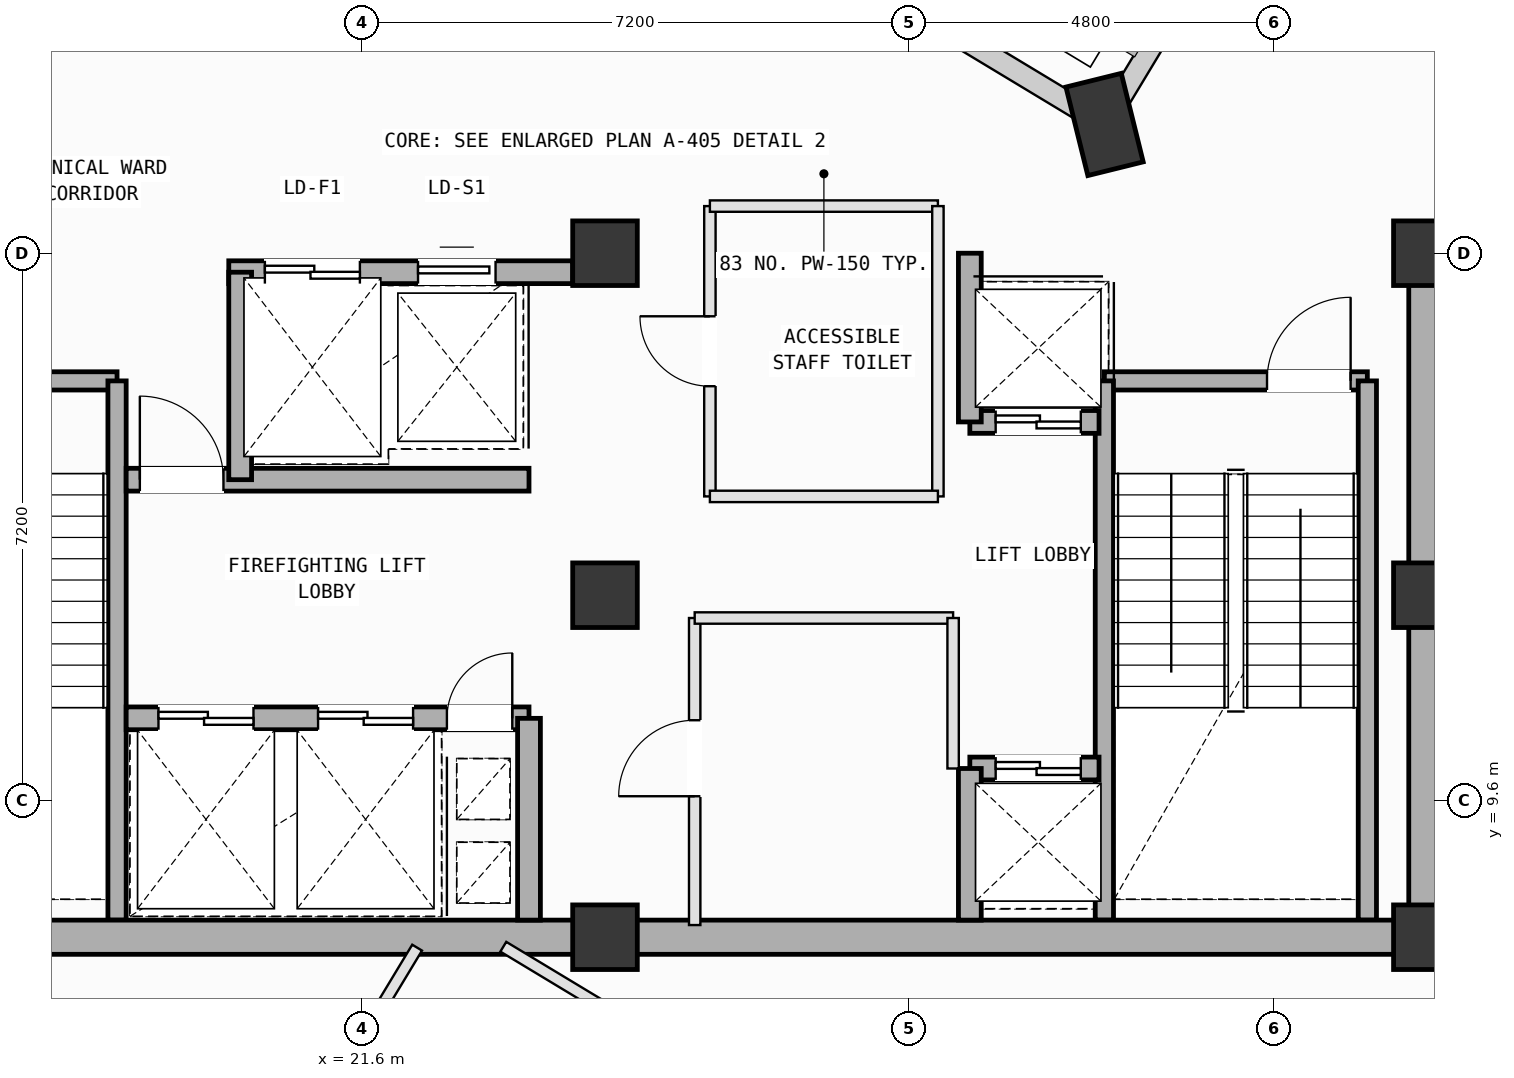
"""IFC4 building model, lengths in metres.
Left out: names, types, materials, properties, quantities, classifications, styles, units other than length and angle.
Written with IfcOpenShell. Run it as: python <this file> out.ifc"""

import sys

from ifc_helpers import new_model, si_unit, direction, frame, frame_2d, origin, origin_2d, place, context, subcontext, project, spatial, rectangle, extrude, element, fill, save


model = new_model("IFC4")
c1 = context("Model", 3, precision=1e-05, world=origin(), true_north=direction((0.0, 1.0)))
c2 = subcontext(c1, "Body", "Model", "MODEL_VIEW")
j1 = project(units=[si_unit("LENGTHUNIT", "METRE"), si_unit("PLANEANGLEUNIT", "RADIAN")], contexts=[c1])
p1 = place(None, origin())
s1 = spatial("IfcSite", under=j1, at=p1, CompositionType="ELEMENT")
p2 = place(p1, origin())
s2 = spatial("IfcBuilding", under=s1, at=p2, CompositionType="ELEMENT")
p3 = place(p2, frame((0.0, 0.0, 276.6)))
s3 = spatial("IfcBuildingStorey", under=s2, at=p3, CompositionType="ELEMENT", Elevation=276.6)
for number, where, z_axis, x_axis in (
    (1, (24.8, 7.8, 0.0), (0.0, 0.0, 1.0), (1.0, 0.0, 0.0)),
    (2, (24.8, 12.3, 0.0), (0.0, 0.0, 1.0), (1.0, 0.0, 0.0)),
    (3, (24.8, 16.8, 0.0), (0.0, 0.0, 1.0), (1.0, 0.0, 0.0)),
    (4, (35.6, 7.8, 0.0), (0.0, 0.0, 1.0), (1.0, 0.0, 0.0)),
    (5, (35.6, 12.3, 0.0), (0.0, 0.0, 1.0), (1.0, 0.0, 0.0)),
    (6, (35.6, 16.8, 0.0), (0.0, 0.0, 1.0), (1.0, 0.0, 0.0)),
):
    element("IfcColumn", number, at=place(p3, frame(where, z_axis=z_axis, x_axis=x_axis)), inside=s3, PredefinedType="COLUMN", context=c2, shape_type="SweptSolid", body=[
        extrude(rectangle(XDim=0.85, YDim=0.85, at=origin_2d()), origin(), (0.0, 0.0, 1.0), 4.0),
    ])
p4 = place(p3, frame((31.373, 18.494, 0.002), z_axis=(0.026198010128, -0.009038008156, 0.999615915577), x_axis=(-0.995635940105, 0.089360928723, 0.026901657753)))
e7 = element("IfcColumn", 7, at=p4, inside=s3, PredefinedType="COLUMN", context=c2, shape_type="SweptSolid", body=[
    extrude(rectangle(XDim=1.2, YDim=0.75, at=origin_2d()), origin(), (0.0, 0.0, 1.0), 3.998),
])
p5 = place(p3, frame((18.206, 4.353, 0.0), z_axis=(0.0, 0.0, 1.0), x_axis=(-0.856267913318, 0.516531955084, 0.0)))
e8 = element("IfcWall", 8, at=p5, inside=s3, PredefinedType="SOLIDWALL", context=c2, shape_type="SweptSolid", body=[
    extrude(rectangle(XDim=6.96, YDim=0.24, at=frame_2d((3.48, 0.0))), origin(), (0.0, 0.0, 1.0), 3.265),
])
p6 = place(p5, frame((2.93, 0.0, 0.0)))
e9 = element("IfcOpeningElement", 9, at=p6, cuts=e8, PredefinedType="OPENING", context=c2, shape_type="SweptSolid", body=[
    extrude(rectangle(XDim=1.1, YDim=2.15, at=frame_2d((0.55, 1.075))), frame((0.0, 0.13, 0.0), z_axis=(0.0, -1.0, 0.0), x_axis=(1.0, 0.0, 0.0)), (0.0, 0.0, 1.0), 0.26),
])
p7 = place(p3, frame((31.582, 18.841, 0.0), z_axis=(0.0, 0.0, 1.0), x_axis=(0.516523161172, 0.856273218064, 0.0)))
e10 = element("IfcWall", 10, at=p7, inside=s3, PredefinedType="SOLIDWALL", context=c2, shape_type="SweptSolid", body=[
    extrude(rectangle(XDim=6.158, YDim=0.28, at=frame_2d((3.079, 0.0))), origin(), (0.0, 0.0, 1.0), 3.265),
])
p8 = place(p7, frame((3.84, 0.0, 0.75)))
e11 = element("IfcOpeningElement", 11, at=p8, cuts=e10, PredefinedType="OPENING", context=c2, shape_type="SweptSolid", body=[
    extrude(rectangle(XDim=1.4, YDim=1.85, at=frame_2d((0.7, 0.925))), frame((0.0, 0.15, 0.0), z_axis=(0.0, -1.0, 0.0), x_axis=(1.0, 0.0, 0.0)), (0.0, 0.0, 1.0), 0.3),
])
p9 = place(p3, frame((25.121, 22.265, 0.0), z_axis=(0.0, 0.0, 1.0), x_axis=(0.856273819438, -0.516522164233, 0.0)))
e12 = element("IfcWall", 12, at=p9, inside=s3, PredefinedType="SOLIDWALL", context=c2, shape_type="SweptSolid", body=[
    extrude(rectangle(XDim=6.958, YDim=0.28, at=frame_2d((3.479, 0.0))), origin(), (0.0, 0.0, 1.0), 3.165),
])
p10 = place(p3, frame((14.92, 15.12, 0.0), z_axis=(0.0, 0.0, 1.0), x_axis=(1.0, 0.0, 0.0)))
e13 = element("IfcWall", 13, at=p10, inside=s3, PredefinedType="SOLIDWALL", context=c2, shape_type="SweptSolid", body=[
    extrude(rectangle(XDim=3.46, YDim=0.24, at=frame_2d((1.73, 0.0))), origin(), (0.0, 0.0, 1.0), 3.78),
])
p11 = place(p10, frame((0.22, 0.0, 0.0)))
e14 = element("IfcOpeningElement", 14, at=p11, cuts=e13, PredefinedType="OPENING", context=c2, shape_type="SweptSolid", body=[
    extrude(rectangle(XDim=1.1, YDim=2.15, at=frame_2d((0.55, 1.075))), frame((0.0, 0.13, 0.0), z_axis=(0.0, -1.0, 0.0), x_axis=(1.0, 0.0, 0.0)), (0.0, 0.0, 1.0), 0.26),
])
p12 = place(p3, frame((18.38, 15.12, 0.0), z_axis=(0.0, 0.0, 1.0), x_axis=(0.0, -1.0, 0.0)))
e15 = element("IfcWall", 15, at=p12, inside=s3, PredefinedType="SOLIDWALL", context=c2, shape_type="SweptSolid", body=[
    extrude(rectangle(XDim=7.095, YDim=0.24, at=frame_2d((3.548, 0.0))), origin(), (0.0, 0.0, 1.0), 3.78),
])
p13 = place(p3, frame((31.37, 15.12, 0.0), z_axis=(0.0, 0.0, 1.0), x_axis=(1.0, 0.0, 0.0)))
e16 = element("IfcWall", 16, at=p13, inside=s3, PredefinedType="SOLIDWALL", context=c2, shape_type="SweptSolid", body=[
    extrude(rectangle(XDim=3.46, YDim=0.24, at=frame_2d((1.73, 0.0))), origin(), (0.0, 0.0, 1.0), 3.78),
])
p14 = place(p13, frame((2.14, 0.0, 0.0)))
e17 = element("IfcOpeningElement", 17, at=p14, cuts=e16, PredefinedType="OPENING", context=c2, shape_type="SweptSolid", body=[
    extrude(rectangle(XDim=1.1, YDim=2.15, at=frame_2d((0.55, 1.075))), frame((0.0, 0.13, 0.0), z_axis=(0.0, -1.0, 0.0), x_axis=(1.0, 0.0, 0.0)), (0.0, 0.0, 1.0), 0.26),
])
for number, where, z_axis, x_axis in (
    (18, (34.83, 15.12, 0.0), (0.0, 0.0, 1.0), (0.0, -1.0, 0.0)),
    (19, (31.37, 8.025, 0.0), (0.0, 0.0, 1.0), (0.0, 1.0, 0.0)),
):
    element("IfcWall", number, at=place(p3, frame(where, z_axis=z_axis, x_axis=x_axis)), inside=s3, PredefinedType="SOLIDWALL", context=c2, shape_type="SweptSolid", body=[
        extrude(rectangle(XDim=7.095, YDim=0.24, at=frame_2d((3.548, 0.0))), origin(), (0.0, 0.0, 1.0), 3.78),
    ])
for number, where, z_axis, x_axis in (
    (20, (14.0, 7.8, 0.0), (0.0, 0.0, 1.0), (1.0, 0.0, 0.0)),
    (21, (24.8, 7.8, 0.0), (0.0, 0.0, 1.0), (1.0, 0.0, 0.0)),
):
    element("IfcWall", number, at=place(p3, frame(where, z_axis=z_axis, x_axis=x_axis)), inside=s3, PredefinedType="SHEAR", context=c2, shape_type="SweptSolid", body=[
        extrude(rectangle(XDim=10.8, YDim=0.45, at=frame_2d((5.4, 0.0))), origin(), (0.0, 0.0, 1.0), 3.78),
    ])
p15 = place(p3, frame((35.6, 7.8, 0.0), z_axis=(0.0, 0.0, 1.0), x_axis=(0.0, 1.0, 0.0)))
e22 = element("IfcWall", 22, at=p15, inside=s3, PredefinedType="SHEAR", context=c2, shape_type="SweptSolid", body=[
    extrude(rectangle(XDim=9.0, YDim=0.45, at=frame_2d((4.5, 0.0))), origin(), (0.0, 0.0, 1.0), 3.78),
])
p16 = place(p3, frame((19.85, 16.55, 0.0), z_axis=(0.0, 0.0, 1.0), x_axis=(1.0, 0.0, 0.0)))
e23 = element("IfcWall", 23, at=p16, inside=s3, PredefinedType="SOLIDWALL", context=c2, shape_type="SweptSolid", body=[
    extrude(rectangle(XDim=4.525, YDim=0.3, at=frame_2d((2.262, 0.0))), origin(), (0.0, 0.0, 1.0), 3.78),
])
p17 = place(p16, frame((0.475, 0.0, 0.0)))
e24 = element("IfcOpeningElement", 24, at=p17, cuts=e23, PredefinedType="OPENING", context=c2, shape_type="SweptSolid", body=[
    extrude(rectangle(XDim=1.25, YDim=2.18, at=frame_2d((0.625, 1.09))), frame((0.0, 0.16, 0.0), z_axis=(0.0, -1.0, 0.0), x_axis=(1.0, 0.0, 0.0)), (0.0, 0.0, 1.0), 0.32),
])
p18 = place(p16, frame((2.49, 0.0, 0.0)))
e25 = element("IfcOpeningElement", 25, at=p18, cuts=e23, PredefinedType="OPENING", context=c2, shape_type="SweptSolid", body=[
    extrude(rectangle(XDim=1.02, YDim=2.12, at=frame_2d((0.51, 1.06))), frame((0.0, 0.16, 0.0), z_axis=(0.0, -1.0, 0.0), x_axis=(1.0, 0.0, 0.0)), (0.0, 0.0, 1.0), 0.32),
])
p19 = place(p3, frame((18.5, 10.68, 0.0), z_axis=(0.0, 0.0, 1.0), x_axis=(1.0, 0.0, 0.0)))
e26 = element("IfcWall", 26, at=p19, inside=s3, PredefinedType="SOLIDWALL", context=c2, shape_type="SweptSolid", body=[
    extrude(rectangle(XDim=5.3, YDim=0.3, at=frame_2d((2.65, 0.0))), origin(), (0.0, 0.0, 1.0), 3.78),
])
p20 = place(p19, frame((4.22, 0.0, 0.0)))
e27 = element("IfcOpeningElement", 27, at=p20, cuts=e26, PredefinedType="OPENING", context=c2, shape_type="SweptSolid", body=[
    extrude(rectangle(XDim=0.86, YDim=2.06, at=frame_2d((0.43, 1.03))), frame((0.0, 0.16, 0.0), z_axis=(0.0, -1.0, 0.0), x_axis=(1.0, 0.0, 0.0)), (0.0, 0.0, 1.0), 0.32),
])
p21 = place(p19, frame((0.425, 0.0, 0.0)))
e28 = element("IfcOpeningElement", 28, at=p21, cuts=e26, PredefinedType="OPENING", context=c2, shape_type="SweptSolid", body=[
    extrude(rectangle(XDim=1.25, YDim=2.18, at=frame_2d((0.625, 1.09))), frame((0.0, 0.16, 0.0), z_axis=(0.0, -1.0, 0.0), x_axis=(1.0, 0.0, 0.0)), (0.0, 0.0, 1.0), 0.32),
])
p22 = place(p19, frame((2.525, 0.0, 0.0)))
e29 = element("IfcOpeningElement", 29, at=p22, cuts=e26, PredefinedType="OPENING", context=c2, shape_type="SweptSolid", body=[
    extrude(rectangle(XDim=1.25, YDim=2.18, at=frame_2d((0.625, 1.09))), frame((0.0, 0.16, 0.0), z_axis=(0.0, -1.0, 0.0), x_axis=(1.0, 0.0, 0.0)), (0.0, 0.0, 1.0), 0.32),
])
p23 = place(p3, frame((18.5, 13.82, 0.0), z_axis=(0.0, 0.0, 1.0), x_axis=(1.0, 0.0, 0.0)))
e30 = element("IfcWall", 30, at=p23, inside=s3, PredefinedType="SOLIDWALL", context=c2, shape_type="SweptSolid", body=[
    extrude(rectangle(XDim=5.3, YDim=0.3, at=frame_2d((2.65, 0.0))), origin(), (0.0, 0.0, 1.0), 3.78),
])
p24 = place(p23, frame((0.18, 0.0, 0.0)))
e31 = element("IfcOpeningElement", 31, at=p24, cuts=e30, PredefinedType="OPENING", context=c2, shape_type="SweptSolid", body=[
    extrude(rectangle(XDim=1.1, YDim=2.15, at=frame_2d((0.55, 1.075))), frame((0.0, 0.16, 0.0), z_axis=(0.0, -1.0, 0.0), x_axis=(1.0, 0.0, 0.0)), (0.0, 0.0, 1.0), 0.32),
])
p25 = place(p3, frame((23.8, 8.025, 0.0), z_axis=(0.0, 0.0, 1.0), x_axis=(0.0, 1.0, 0.0)))
e32 = element("IfcWall", 32, at=p25, inside=s3, PredefinedType="SOLIDWALL", context=c2, shape_type="SweptSolid", body=[
    extrude(rectangle(XDim=2.655, YDim=0.3, at=frame_2d((1.328, 0.0))), origin(), (0.0, 0.0, 1.0), 3.78),
])
p26 = place(p3, frame((20.0, 13.82, 0.0), z_axis=(0.0, 0.0, 1.0), x_axis=(0.0, 1.0, 0.0)))
e33 = element("IfcWall", 33, at=p26, inside=s3, PredefinedType="SOLIDWALL", context=c2, shape_type="SweptSolid", body=[
    extrude(rectangle(XDim=2.73, YDim=0.3, at=frame_2d((1.365, 0.0))), origin(), (0.0, 0.0, 1.0), 3.78),
])
p27 = place(p3, frame((29.6, 10.02, 0.0), z_axis=(0.0, 0.0, 1.0), x_axis=(1.0, 0.0, 0.0)))
e34 = element("IfcWall", 34, at=p27, inside=s3, PredefinedType="SOLIDWALL", context=c2, shape_type="SweptSolid", body=[
    extrude(rectangle(XDim=1.7, YDim=0.3, at=frame_2d((0.85, 0.0))), origin(), (0.0, 0.0, 1.0), 3.78),
])
p28 = place(p27, frame((0.34, 0.0, 0.0)))
e35 = element("IfcOpeningElement", 35, at=p28, cuts=e34, PredefinedType="OPENING", context=c2, shape_type="SweptSolid", body=[
    extrude(rectangle(XDim=1.12, YDim=2.15, at=frame_2d((0.56, 1.075))), frame((0.0, 0.16, 0.0), z_axis=(0.0, -1.0, 0.0), x_axis=(1.0, 0.0, 0.0)), (0.0, 0.0, 1.0), 0.32),
])
p29 = place(p3, frame((29.6, 8.025, 0.0), z_axis=(0.0, 0.0, 1.0), x_axis=(0.0, 1.0, 0.0)))
e36 = element("IfcWall", 36, at=p29, inside=s3, PredefinedType="SOLIDWALL", context=c2, shape_type="SweptSolid", body=[
    extrude(rectangle(XDim=1.995, YDim=0.3, at=frame_2d((0.998, 0.0))), origin(), (0.0, 0.0, 1.0), 3.78),
])
p30 = place(p3, frame((29.6, 14.58, 0.0), z_axis=(0.0, 0.0, 1.0), x_axis=(1.0, 0.0, 0.0)))
e37 = element("IfcWall", 37, at=p30, inside=s3, PredefinedType="SOLIDWALL", context=c2, shape_type="SweptSolid", body=[
    extrude(rectangle(XDim=1.7, YDim=0.3, at=frame_2d((0.85, 0.0))), origin(), (0.0, 0.0, 1.0), 3.78),
])
p31 = place(p30, frame((0.34, 0.0, 0.0)))
e38 = element("IfcOpeningElement", 38, at=p31, cuts=e37, PredefinedType="OPENING", context=c2, shape_type="SweptSolid", body=[
    extrude(rectangle(XDim=1.12, YDim=2.15, at=frame_2d((0.56, 1.075))), frame((0.0, 0.16, 0.0), z_axis=(0.0, -1.0, 0.0), x_axis=(1.0, 0.0, 0.0)), (0.0, 0.0, 1.0), 0.32),
])
p32 = place(p3, frame((29.6, 14.58, 0.0), z_axis=(0.0, 0.0, 1.0), x_axis=(0.0, 1.0, 0.0)))
e39 = element("IfcWall", 39, at=p32, inside=s3, PredefinedType="SOLIDWALL", context=c2, shape_type="SweptSolid", body=[
    extrude(rectangle(XDim=2.22, YDim=0.3, at=frame_2d((1.11, 0.0))), origin(), (0.0, 0.0, 1.0), 3.78),
])
p33 = place(p3, frame((25.98, 7.96, 0.0), z_axis=(0.0, 0.0, 1.0), x_axis=(0.0, 1.0, 0.0)))
e40 = element("IfcWall", 40, at=p33, inside=s3, PredefinedType="PARTITIONING", context=c2, shape_type="SweptSolid", body=[
    extrude(rectangle(XDim=4.04, YDim=0.15, at=frame_2d((2.02, 0.0))), origin(), (0.0, 0.0, 1.0), 3.78),
])
p34 = place(p33, frame((1.695, 0.0, 0.0)))
e41 = element("IfcOpeningElement", 41, at=p34, cuts=e40, PredefinedType="OPENING", context=c2, shape_type="SweptSolid", body=[
    extrude(rectangle(XDim=1.0, YDim=2.12, at=frame_2d((0.5, 1.06))), frame((0.0, 0.085, 0.0), z_axis=(0.0, -1.0, 0.0), x_axis=(1.0, 0.0, 0.0)), (0.0, 0.0, 1.0), 0.17),
])
p35 = place(p3, frame((25.98, 12.0, 0.0), z_axis=(0.0, 0.0, 1.0), x_axis=(1.0, 0.0, 0.0)))
e42 = element("IfcWall", 42, at=p35, inside=s3, PredefinedType="PARTITIONING", context=c2, shape_type="SweptSolid", body=[
    extrude(rectangle(XDim=3.4, YDim=0.15, at=frame_2d((1.7, 0.0))), origin(), (0.0, 0.0, 1.0), 3.78),
])
p36 = place(p3, frame((29.38, 12.0, 0.0), z_axis=(0.0, 0.0, 1.0), x_axis=(0.0, -1.0, 0.0)))
e43 = element("IfcWall", 43, at=p36, inside=s3, PredefinedType="PARTITIONING", context=c2, shape_type="SweptSolid", body=[
    extrude(rectangle(XDim=1.98, YDim=0.15, at=frame_2d((0.99, 0.0))), origin(), (0.0, 0.0, 1.0), 3.78),
])
p37 = place(p3, frame((26.18, 13.6, 0.0), z_axis=(0.0, 0.0, 1.0), x_axis=(0.0, 1.0, 0.0)))
e44 = element("IfcWall", 44, at=p37, inside=s3, PredefinedType="PARTITIONING", context=c2, shape_type="SweptSolid", body=[
    extrude(rectangle(XDim=3.82, YDim=0.15, at=frame_2d((1.91, 0.0))), origin(), (0.0, 0.0, 1.0), 3.78),
])
p38 = place(p37, frame((1.45, 0.0, 0.0)))
e45 = element("IfcOpeningElement", 45, at=p38, cuts=e44, PredefinedType="OPENING", context=c2, shape_type="SweptSolid", body=[
    extrude(rectangle(XDim=0.92, YDim=2.1, at=frame_2d((0.46, 1.05))), frame((0.0, 0.085, 0.0), z_axis=(0.0, -1.0, 0.0), x_axis=(1.0, 0.0, 0.0)), (0.0, 0.0, 1.0), 0.17),
])
p39 = place(p3, frame((26.18, 17.42, 0.0), z_axis=(0.0, 0.0, 1.0), x_axis=(1.0, 0.0, 0.0)))
e46 = element("IfcWall", 46, at=p39, inside=s3, PredefinedType="PARTITIONING", context=c2, shape_type="SweptSolid", body=[
    extrude(rectangle(XDim=3.0, YDim=0.15, at=frame_2d((1.5, 0.0))), origin(), (0.0, 0.0, 1.0), 3.78),
])
p40 = place(p3, frame((29.18, 17.42, 0.0), z_axis=(0.0, 0.0, 1.0), x_axis=(0.0, -1.0, 0.0)))
e47 = element("IfcWall", 47, at=p40, inside=s3, PredefinedType="PARTITIONING", context=c2, shape_type="SweptSolid", body=[
    extrude(rectangle(XDim=3.82, YDim=0.15, at=frame_2d((1.91, 0.0))), origin(), (0.0, 0.0, 1.0), 3.78),
])
p41 = place(p3, frame((29.18, 13.6, 0.0), z_axis=(0.0, 0.0, 1.0), x_axis=(-1.0, 0.0, 0.0)))
e48 = element("IfcWall", 48, at=p41, inside=s3, PredefinedType="PARTITIONING", context=c2, shape_type="SweptSolid", body=[
    extrude(rectangle(XDim=3.0, YDim=0.15, at=frame_2d((1.5, 0.0))), origin(), (0.0, 0.0, 1.0), 3.78),
])
p42 = place(p3, frame((18.795, 1.807, 0.0), z_axis=(0.0, 0.0, 1.0), x_axis=(0.516562549991, 0.856249456611, 0.0)))
e49 = element("IfcWall", 49, at=p42, inside=s3, PredefinedType="PARTITIONING", context=c2, shape_type="SweptSolid", body=[
    extrude(rectangle(XDim=6.839, YDim=0.15, at=frame_2d((3.42, 0.0))), origin(), (0.0, 0.0, 1.0), 3.78),
])
p43 = place(p3, frame((23.462, 7.675, 0.0), z_axis=(0.0, 0.0, 1.0), x_axis=(0.856286045931, -0.516501895005, 0.0)))
e50 = element("IfcWall", 50, at=p43, inside=s3, PredefinedType="PARTITIONING", context=c2, shape_type="SweptSolid", body=[
    extrude(rectangle(XDim=12.376, YDim=0.15, at=frame_2d((6.188, 0.0))), origin(), (0.0, 0.0, 1.0), 3.78),
])
p44 = place(p14, origin())
e51 = element("IfcDoor", 51, at=p44, inside=s3, OperationType="SINGLE_SWING_RIGHT", PredefinedType="DOOR", context=c2, shape_type="SweptSolid", body=[
    extrude(rectangle(XDim=1.1, YDim=2.15, at=frame_2d((0.55, 1.075))), frame((0.0, 0.025, 0.0), z_axis=(0.0, -1.0, 0.0), x_axis=(1.0, 0.0, 0.0)), (0.0, 0.0, 1.0), 0.05),
])
fill(e17, e51)
p45 = place(p20, origin())
e52 = element("IfcDoor", 52, at=p45, inside=s3, OperationType="SINGLE_SWING_RIGHT", PredefinedType="DOOR", context=c2, shape_type="SweptSolid", body=[
    extrude(rectangle(XDim=0.86, YDim=2.06, at=frame_2d((0.43, 1.03))), frame((0.0, 0.025, 0.0), z_axis=(0.0, -1.0, 0.0), x_axis=(1.0, 0.0, 0.0)), (0.0, 0.0, 1.0), 0.05),
])
fill(e27, e52)
p46 = place(p24, origin())
e53 = element("IfcDoor", 53, at=p46, inside=s3, OperationType="SINGLE_SWING_LEFT", PredefinedType="DOOR", context=c2, shape_type="SweptSolid", body=[
    extrude(rectangle(XDim=1.1, YDim=2.15, at=frame_2d((0.55, 1.075))), frame((0.0, 0.025, 0.0), z_axis=(0.0, -1.0, 0.0), x_axis=(1.0, 0.0, 0.0)), (0.0, 0.0, 1.0), 0.05),
])
fill(e31, e53)
p47 = place(p21, origin())
e54 = element("IfcDoor", 54, at=p47, inside=s3, OperationType="DOUBLE_DOOR_SLIDING", PredefinedType="DOOR", context=c2, shape_type="SweptSolid", body=[
    extrude(rectangle(XDim=1.25, YDim=2.18, at=frame_2d((0.625, 1.09))), frame((0.0, 0.025, 0.0), z_axis=(0.0, -1.0, 0.0), x_axis=(1.0, 0.0, 0.0)), (0.0, 0.0, 1.0), 0.05),
])
fill(e28, e54)
p48 = place(p22, origin())
e55 = element("IfcDoor", 55, at=p48, inside=s3, OperationType="DOUBLE_DOOR_SLIDING", PredefinedType="DOOR", context=c2, shape_type="SweptSolid", body=[
    extrude(rectangle(XDim=1.25, YDim=2.18, at=frame_2d((0.625, 1.09))), frame((0.0, 0.025, 0.0), z_axis=(0.0, -1.0, 0.0), x_axis=(1.0, 0.0, 0.0)), (0.0, 0.0, 1.0), 0.05),
])
fill(e29, e55)
p49 = place(p28, origin())
e56 = element("IfcDoor", 56, at=p49, inside=s3, OperationType="DOUBLE_DOOR_SLIDING", PredefinedType="DOOR", context=c2, shape_type="SweptSolid", body=[
    extrude(rectangle(XDim=1.12, YDim=2.15, at=frame_2d((0.56, 1.075))), frame((0.0, 0.025, 0.0), z_axis=(0.0, -1.0, 0.0), x_axis=(1.0, 0.0, 0.0)), (0.0, 0.0, 1.0), 0.05),
])
fill(e35, e56)
p50 = place(p31, origin())
e57 = element("IfcDoor", 57, at=p50, inside=s3, OperationType="DOUBLE_DOOR_SLIDING", PredefinedType="DOOR", context=c2, shape_type="SweptSolid", body=[
    extrude(rectangle(XDim=1.12, YDim=2.15, at=frame_2d((0.56, 1.075))), frame((0.0, 0.025, 0.0), z_axis=(0.0, -1.0, 0.0), x_axis=(1.0, 0.0, 0.0)), (0.0, 0.0, 1.0), 0.05),
])
fill(e38, e57)
p51 = place(p17, origin())
e58 = element("IfcDoor", 58, at=p51, inside=s3, OperationType="DOUBLE_DOOR_SLIDING", PredefinedType="DOOR", context=c2, shape_type="SweptSolid", body=[
    extrude(rectangle(XDim=1.25, YDim=2.18, at=frame_2d((0.625, 1.09))), frame((0.0, 0.025, 0.0), z_axis=(0.0, -1.0, 0.0), x_axis=(1.0, 0.0, 0.0)), (0.0, 0.0, 1.0), 0.05),
])
fill(e24, e58)
p52 = place(p18, origin())
e59 = element("IfcDoor", 59, at=p52, inside=s3, OperationType="SLIDING_TO_LEFT", PredefinedType="DOOR", context=c2, shape_type="SweptSolid", body=[
    extrude(rectangle(XDim=1.02, YDim=2.12, at=frame_2d((0.51, 1.06))), frame((0.0, 0.025, 0.0), z_axis=(0.0, -1.0, 0.0), x_axis=(1.0, 0.0, 0.0)), (0.0, 0.0, 1.0), 0.05),
])
fill(e25, e59)
p53 = place(p34, origin())
e60 = element("IfcDoor", 60, at=p53, inside=s3, OperationType="SINGLE_SWING_LEFT", PredefinedType="DOOR", context=c2, shape_type="SweptSolid", body=[
    extrude(rectangle(XDim=1.0, YDim=2.12, at=frame_2d((0.5, 1.06))), frame((0.0, 0.025, 0.0), z_axis=(0.0, -1.0, 0.0), x_axis=(1.0, 0.0, 0.0)), (0.0, 0.0, 1.0), 0.05),
])
fill(e41, e60)
p54 = place(p38, origin())
e61 = element("IfcDoor", 61, at=p54, inside=s3, OperationType="SINGLE_SWING_RIGHT", PredefinedType="DOOR", context=c2, shape_type="SweptSolid", body=[
    extrude(rectangle(XDim=0.92, YDim=2.1, at=frame_2d((0.46, 1.05))), frame((0.0, 0.025, 0.0), z_axis=(0.0, -1.0, 0.0), x_axis=(1.0, 0.0, 0.0)), (0.0, 0.0, 1.0), 0.05),
])
fill(e45, e61)
save(model, sys.argv[1])
